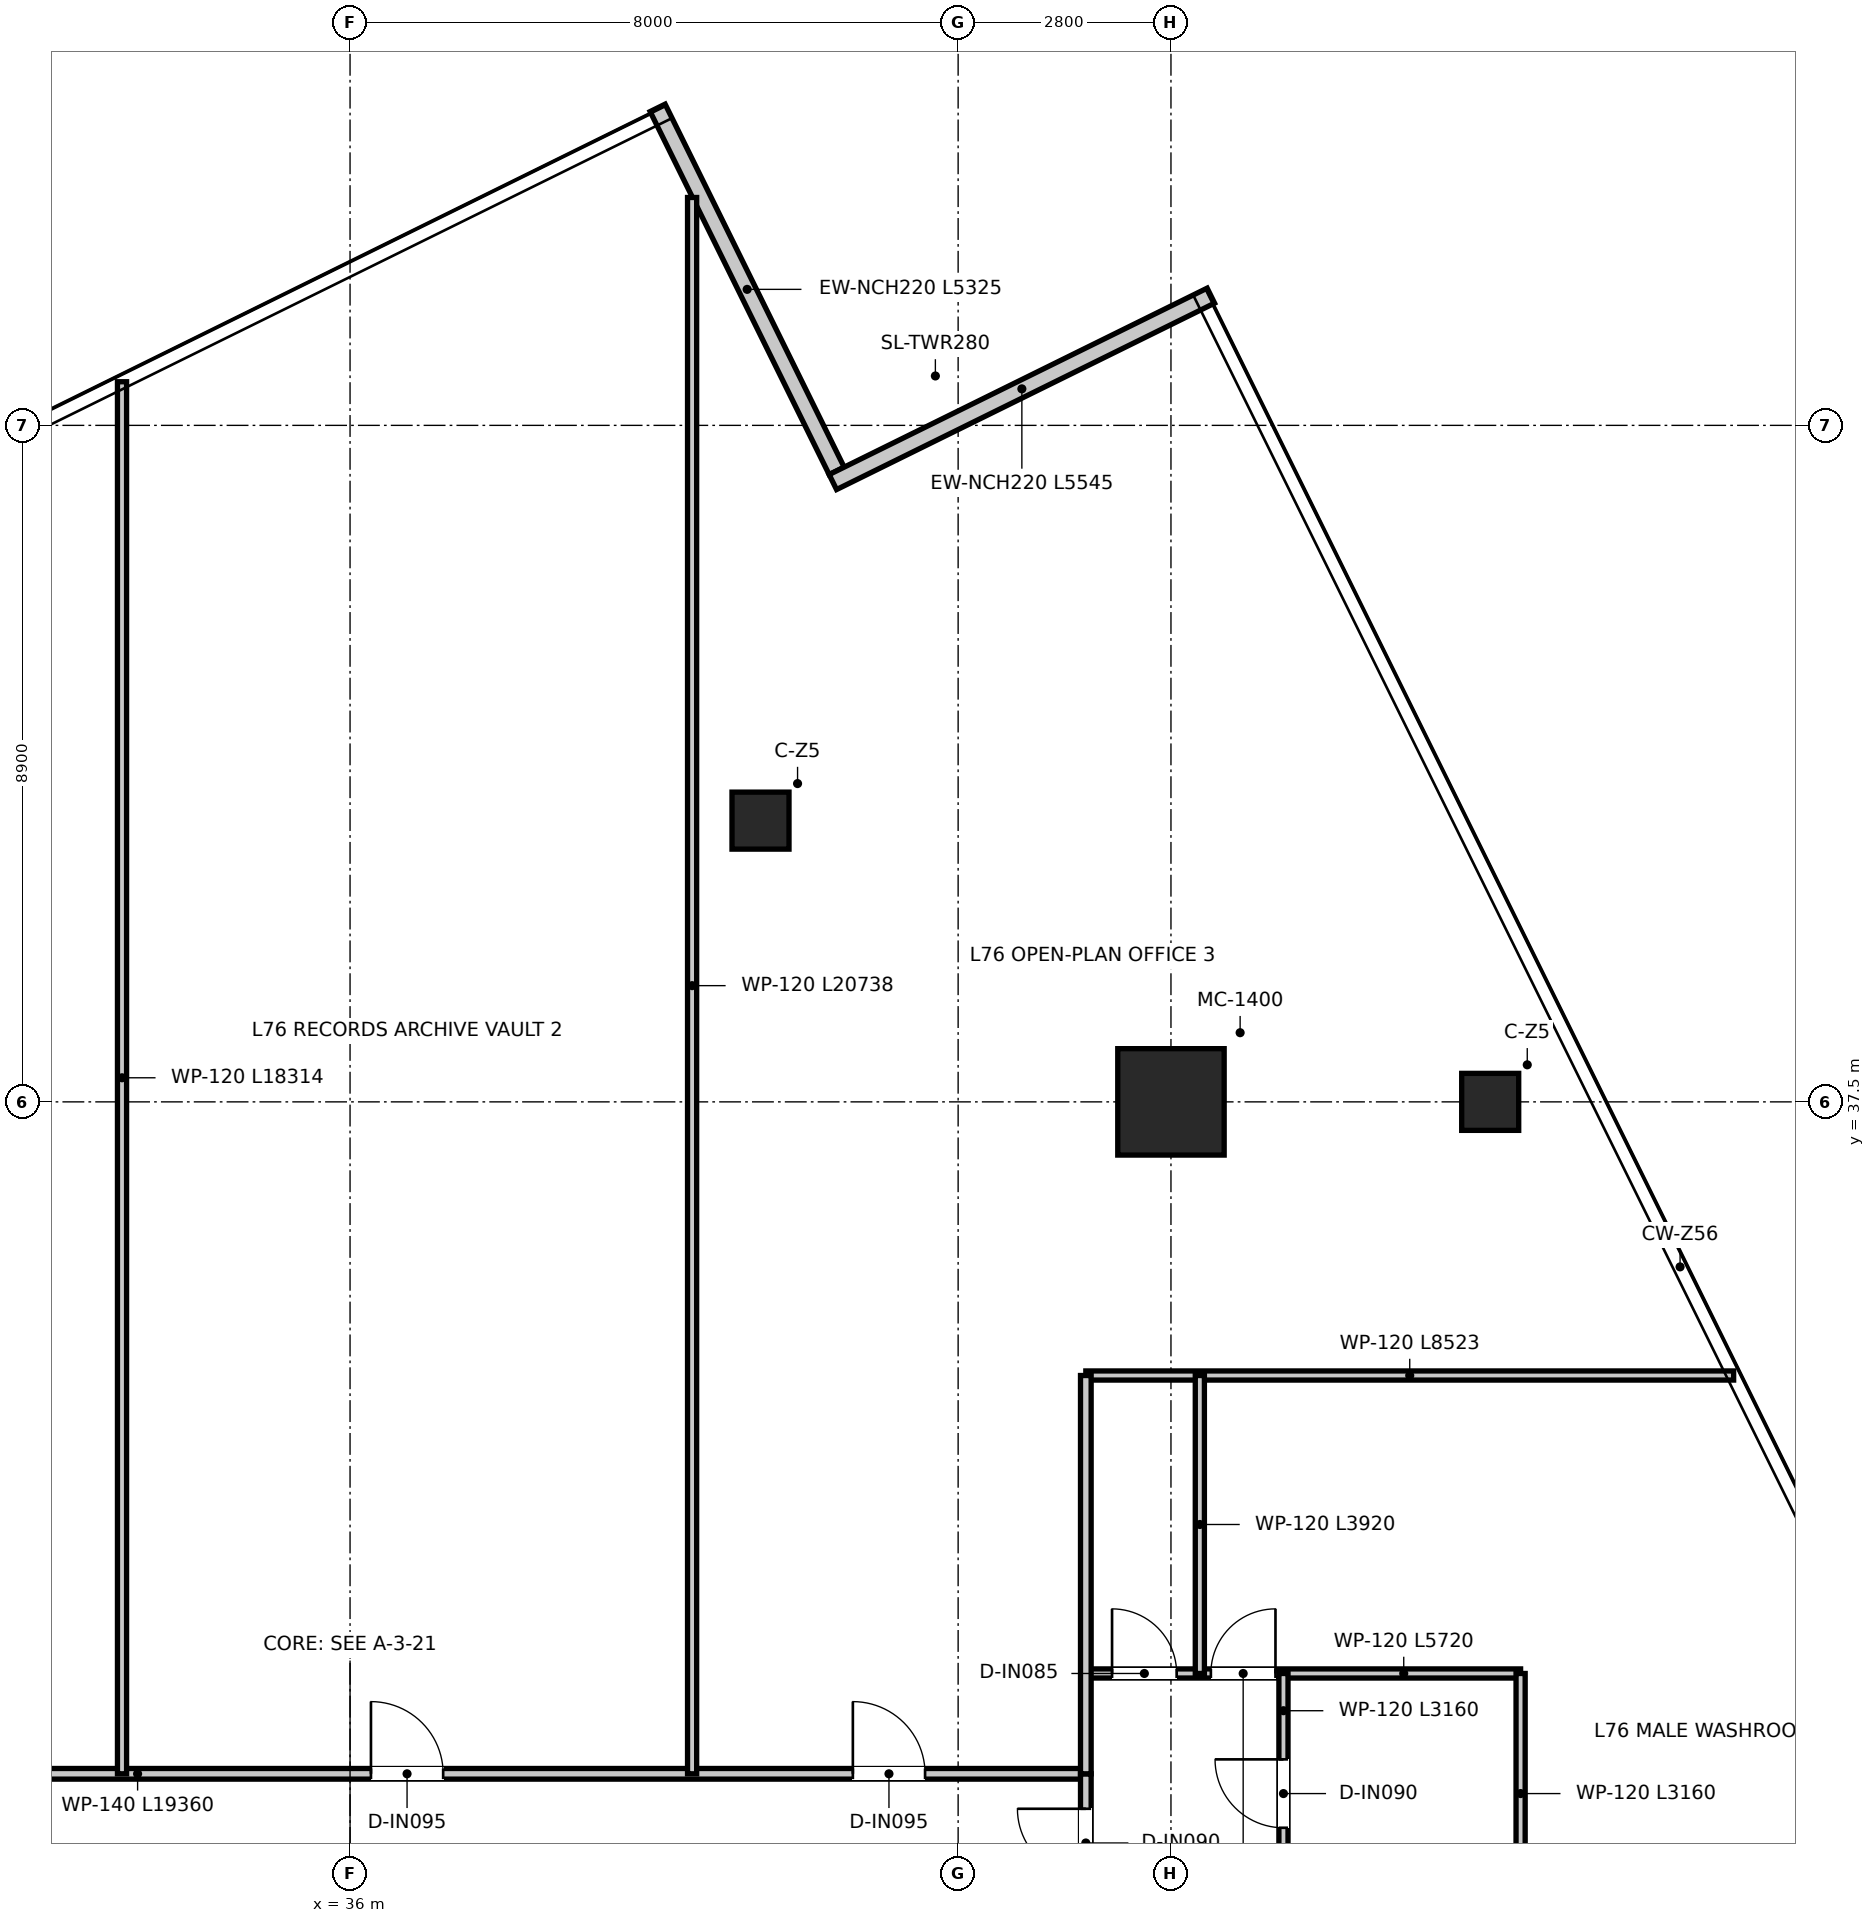
"""IFC4 building model, lengths in metres.
Left out: names, types, materials, properties, quantities, classifications, styles, units other than length and angle.
Written with IfcOpenShell. Run it as: python <this file> out.ifc"""

import sys

from ifc_helpers import new_model, si_unit, direction, frame, frame_2d, origin, origin_2d, place, context, subcontext, project, spatial, rectangle, extrude, source, transform, mapped, element, fill, save


model = new_model("IFC4")
c1 = context("Model", 3, precision=1e-05, world=origin(), true_north=direction((0.0, 1.0)))
c2 = subcontext(c1, "Body", "Model", "MODEL_VIEW")
j1 = project(units=[si_unit("LENGTHUNIT", "METRE"), si_unit("PLANEANGLEUNIT", "RADIAN")], contexts=[c1])
p1 = place(None, origin())
s1 = spatial("IfcSite", under=j1, at=p1, CompositionType="ELEMENT")
p2 = place(p1, origin())
s2 = spatial("IfcBuilding", under=s1, at=p2, CompositionType="ELEMENT")
p3 = place(p2, frame((0.0, 0.0, 310.85)))
s3 = spatial("IfcBuildingStorey", under=s2, at=p3, CompositionType="ELEMENT", Elevation=310.85)
m1 = source(origin(), c2, "Body", "SweptSolid", [
    extrude(rectangle(XDim=1.4, YDim=1.4, at=origin_2d()), origin(), (0.0, 0.0, 1.0), 3.95),
])
p4 = place(p3, frame((46.8, 37.5, 0.0), z_axis=(0.0, 0.0, 1.0), x_axis=(1.0, 0.0, 0.0)))
e1 = element("IfcColumn", 1, at=p4, inside=s3, PredefinedType="USERDEFINED", context=c2, shape_type="MappedRepresentation", body=[
    mapped(m1, transform((0.0, 0.0, 0.0), x_axis=(1.0, 0.0, 0.0), y_axis=(0.0, 1.0, 0.0), z_axis=(0.0, 0.0, 1.0), scale=1.0)),
])
m2 = source(origin(), c2, "Body", "SweptSolid", [
    extrude(rectangle(XDim=0.75, YDim=0.75, at=origin_2d()), origin(), (0.0, 0.0, 1.0), 3.95),
])
for number, where, z_axis, x_axis in (
    (2, (41.4, 41.2, 0.0), (0.0, 0.0, 1.0), (1.0, 0.0, 0.0)),
    (3, (51.0, 37.5, 0.0), (0.0, 0.0, 1.0), (1.0, 0.0, 0.0)),
):
    element("IfcColumn", number, at=place(p3, frame(where, z_axis=z_axis, x_axis=x_axis)), inside=s3, PredefinedType="COLUMN", context=c2, shape_type="MappedRepresentation", body=[
        mapped(m2, transform((0.0, 0.0, 0.0), x_axis=(1.0, 0.0, 0.0), y_axis=(0.0, 1.0, 0.0), z_axis=(0.0, 0.0, 1.0), scale=1.0)),
    ])
p5 = place(p3, frame((42.402, 45.801, 0.0), z_axis=(0.0, 0.0, 1.0), x_axis=(-0.442291978932, 0.896871119712, 0.0)))
e4 = element("IfcWall", 4, at=p5, inside=s3, PredefinedType="ELEMENTEDWALL", context=c2, shape_type="SweptSolid", body=[
    extrude(rectangle(XDim=5.325, YDim=0.22, at=frame_2d((2.663, 0.0))), origin(), (0.0, 0.0, 1.0), 3.67),
])
p6 = place(p3, frame((47.325, 48.106, 0.0), z_axis=(0.0, 0.0, 1.0), x_axis=(-0.896879244314, -0.442275503639, 0.0)))
e5 = element("IfcWall", 5, at=p6, inside=s3, PredefinedType="ELEMENTEDWALL", context=c2, shape_type="SweptSolid", body=[
    extrude(rectangle(XDim=5.545, YDim=0.22, at=frame_2d((2.772, 0.0))), origin(), (0.0, 0.0, 1.0), 3.67),
])
p7 = place(p3, frame((26.32, 28.66, 0.0), z_axis=(0.0, 0.0, 1.0), x_axis=(1.0, 0.0, 0.0)))
e6 = element("IfcWall", 6, at=p7, inside=s3, PredefinedType="PARTITIONING", context=c2, shape_type="SweptSolid", body=[
    extrude(rectangle(XDim=19.36, YDim=0.14, at=frame_2d((9.68, 0.0))), origin(), (0.0, 0.0, 1.0), 3.18),
])
p8 = place(p7, frame((2.865, 0.0, 0.0)))
e7 = element("IfcOpeningElement", 7, at=p8, cuts=e6, PredefinedType="OPENING", context=c2, shape_type="SweptSolid", body=[
    extrude(rectangle(XDim=0.95, YDim=2.1, at=frame_2d((0.475, 1.05))), frame((0.0, 0.08, 0.0), z_axis=(0.0, -1.0, 0.0), x_axis=(1.0, 0.0, 0.0)), (0.0, 0.0, 1.0), 0.16),
])
p9 = place(p7, frame((9.955, 0.0, 0.0)))
e8 = element("IfcOpeningElement", 8, at=p9, cuts=e6, PredefinedType="OPENING", context=c2, shape_type="SweptSolid", body=[
    extrude(rectangle(XDim=0.95, YDim=2.1, at=frame_2d((0.475, 1.05))), frame((0.0, 0.08, 0.0), z_axis=(0.0, -1.0, 0.0), x_axis=(1.0, 0.0, 0.0)), (0.0, 0.0, 1.0), 0.16),
])
p10 = place(p7, frame((16.295, 0.0, 0.0)))
e9 = element("IfcOpeningElement", 9, at=p10, cuts=e6, PredefinedType="OPENING", context=c2, shape_type="SweptSolid", body=[
    extrude(rectangle(XDim=0.95, YDim=2.1, at=frame_2d((0.475, 1.05))), frame((0.0, 0.08, 0.0), z_axis=(0.0, -1.0, 0.0), x_axis=(1.0, 0.0, 0.0)), (0.0, 0.0, 1.0), 0.16),
])
p11 = place(p3, frame((45.68, 9.72, 0.0), z_axis=(0.0, 0.0, 1.0), x_axis=(0.0, 1.0, 0.0)))
e10 = element("IfcWall", 10, at=p11, inside=s3, PredefinedType="PARTITIONING", context=c2, shape_type="SweptSolid", body=[
    extrude(rectangle(XDim=18.94, YDim=0.14, at=frame_2d((9.47, 0.0))), origin(), (0.0, 0.0, 1.0), 3.13),
])
p12 = place(p11, frame((17.58, 0.0, 0.0)))
e11 = element("IfcOpeningElement", 11, at=p12, cuts=e10, PredefinedType="OPENING", context=c2, shape_type="SweptSolid", body=[
    extrude(rectangle(XDim=0.9, YDim=2.1, at=frame_2d((0.45, 1.05))), frame((0.0, 0.08, 0.0), z_axis=(0.0, -1.0, 0.0), x_axis=(1.0, 0.0, 0.0)), (0.0, 0.0, 1.0), 0.16),
])
p13 = place(p11, frame((11.99, 0.0, 0.0)))
e12 = element("IfcOpeningElement", 12, at=p13, cuts=e10, PredefinedType="OPENING", context=c2, shape_type="SweptSolid", body=[
    extrude(rectangle(XDim=0.9, YDim=2.1, at=frame_2d((0.45, 1.05))), frame((0.0, 0.08, 0.0), z_axis=(0.0, -1.0, 0.0), x_axis=(1.0, 0.0, 0.0)), (0.0, 0.0, 1.0), 0.16),
])
p14 = place(p3, frame((45.68, 33.9, 0.0), z_axis=(0.0, 0.0, 1.0), x_axis=(1.0, 0.0, 0.0)))
e13 = element("IfcWall", 13, at=p14, inside=s3, PredefinedType="PARTITIONING", context=c2, shape_type="SweptSolid", body=[
    extrude(rectangle(XDim=8.523, YDim=0.12, at=frame_2d((4.261, 0.0))), origin(), (0.0, 0.0, 1.0), 3.13),
])
p15 = place(p3, frame((45.68, 29.98, 0.0), z_axis=(0.0, 0.0, 1.0), x_axis=(1.0, 0.0, 0.0)))
e14 = element("IfcWall", 14, at=p15, inside=s3, PredefinedType="PARTITIONING", context=c2, shape_type="SweptSolid", body=[
    extrude(rectangle(XDim=5.72, YDim=0.12, at=frame_2d((2.86, 0.0))), origin(), (0.0, 0.0, 1.0), 3.13),
])
p16 = place(p15, frame((1.645, 0.0, 0.0)))
e15 = element("IfcOpeningElement", 15, at=p16, cuts=e14, PredefinedType="OPENING", context=c2, shape_type="SweptSolid", body=[
    extrude(rectangle(XDim=0.85, YDim=2.1, at=frame_2d((0.425, 1.05))), frame((0.0, 0.07, 0.0), z_axis=(0.0, -1.0, 0.0), x_axis=(1.0, 0.0, 0.0)), (0.0, 0.0, 1.0), 0.14),
])
p17 = place(p15, frame((0.345, 0.0, 0.0)))
e16 = element("IfcOpeningElement", 16, at=p17, cuts=e14, PredefinedType="OPENING", context=c2, shape_type="SweptSolid", body=[
    extrude(rectangle(XDim=0.85, YDim=2.1, at=frame_2d((0.425, 1.05))), frame((0.0, 0.07, 0.0), z_axis=(0.0, -1.0, 0.0), x_axis=(1.0, 0.0, 0.0)), (0.0, 0.0, 1.0), 0.14),
])
p18 = place(p3, frame((51.4, 26.82, 0.0), z_axis=(0.0, 0.0, 1.0), x_axis=(0.0, 1.0, 0.0)))
e17 = element("IfcWall", 17, at=p18, inside=s3, PredefinedType="PARTITIONING", context=c2, shape_type="SweptSolid", body=[
    extrude(rectangle(XDim=3.16, YDim=0.12, at=frame_2d((1.58, 0.0))), origin(), (0.0, 0.0, 1.0), 3.67),
])
p19 = place(p3, frame((48.28, 26.82, 0.0), z_axis=(0.0, 0.0, 1.0), x_axis=(0.0, 1.0, 0.0)))
e18 = element("IfcWall", 18, at=p19, inside=s3, PredefinedType="PARTITIONING", context=c2, shape_type="SweptSolid", body=[
    extrude(rectangle(XDim=3.16, YDim=0.12, at=frame_2d((1.58, 0.0))), origin(), (0.0, 0.0, 1.0), 3.18),
])
p20 = place(p19, frame((1.13, 0.0, 0.0)))
e19 = element("IfcOpeningElement", 19, at=p20, cuts=e18, PredefinedType="OPENING", context=c2, shape_type="SweptSolid", body=[
    extrude(rectangle(XDim=0.9, YDim=2.1, at=frame_2d((0.45, 1.05))), frame((0.0, 0.07, 0.0), z_axis=(0.0, -1.0, 0.0), x_axis=(1.0, 0.0, 0.0)), (0.0, 0.0, 1.0), 0.14),
])
p21 = place(p3, frame((47.18, 29.98, 0.0), z_axis=(0.0, 0.0, 1.0), x_axis=(0.0, 1.0, 0.0)))
e20 = element("IfcWall", 20, at=p21, inside=s3, PredefinedType="PARTITIONING", context=c2, shape_type="SweptSolid", body=[
    extrude(rectangle(XDim=3.92, YDim=0.12, at=frame_2d((1.96, 0.0))), origin(), (0.0, 0.0, 1.0), 3.31),
])
p22 = place(p3, frame((45.68, 28.66, 0.0), z_axis=(0.0, 0.0, 1.0), x_axis=(0.0, 1.0, 0.0)))
e21 = element("IfcWall", 21, at=p22, inside=s3, PredefinedType="PARTITIONING", context=c2, shape_type="SweptSolid", body=[
    extrude(rectangle(XDim=5.24, YDim=0.14, at=frame_2d((2.62, 0.0))), origin(), (0.0, 0.0, 1.0), 3.43),
])
p23 = place(p3, frame((33.0, 28.66, 0.0), z_axis=(0.0, 0.0, 1.0), x_axis=(0.0, 1.0, 0.0)))
e22 = element("IfcWall", 22, at=p23, inside=s3, PredefinedType="PARTITIONING", context=c2, shape_type="SweptSolid", body=[
    extrude(rectangle(XDim=18.314, YDim=0.12, at=frame_2d((9.157, 0.0))), origin(), (0.0, 0.0, 1.0), 3.13),
])
p24 = place(p3, frame((40.5, 28.66, 0.0), z_axis=(0.0, 0.0, 1.0), x_axis=(0.0, 1.0, 0.0)))
e23 = element("IfcWall", 23, at=p24, inside=s3, PredefinedType="PARTITIONING", context=c2, shape_type="SweptSolid", body=[
    extrude(rectangle(XDim=20.738, YDim=0.12, at=frame_2d((10.369, 0.0))), origin(), (0.0, 0.0, 1.0), 3.13),
])
p25 = place(p12, origin())
e24 = element("IfcDoor", 24, at=p25, inside=s3, OperationType="SINGLE_SWING_RIGHT", PredefinedType="DOOR", context=c2, shape_type="SweptSolid", body=[
    extrude(rectangle(XDim=0.9, YDim=2.1, at=frame_2d((0.45, 1.05))), frame((0.0, 0.025, 0.0), z_axis=(0.0, -1.0, 0.0), x_axis=(1.0, 0.0, 0.0)), (0.0, 0.0, 1.0), 0.05),
])
fill(e11, e24)
p26 = place(p16, origin())
e25 = element("IfcDoor", 25, at=p26, inside=s3, OperationType="SINGLE_SWING_RIGHT", PredefinedType="DOOR", context=c2, shape_type="SweptSolid", body=[
    extrude(rectangle(XDim=0.85, YDim=2.1, at=frame_2d((0.425, 1.05))), frame((0.0, 0.025, 0.0), z_axis=(0.0, -1.0, 0.0), x_axis=(1.0, 0.0, 0.0)), (0.0, 0.0, 1.0), 0.05),
])
fill(e15, e25)
p27 = place(p17, origin())
e26 = element("IfcDoor", 26, at=p27, inside=s3, OperationType="SINGLE_SWING_LEFT", PredefinedType="DOOR", context=c2, shape_type="SweptSolid", body=[
    extrude(rectangle(XDim=0.85, YDim=2.1, at=frame_2d((0.425, 1.05))), frame((0.0, 0.025, 0.0), z_axis=(0.0, -1.0, 0.0), x_axis=(1.0, 0.0, 0.0)), (0.0, 0.0, 1.0), 0.05),
])
fill(e16, e26)
p28 = place(p20, origin())
e27 = element("IfcDoor", 27, at=p28, inside=s3, OperationType="SINGLE_SWING_RIGHT", PredefinedType="DOOR", context=c2, shape_type="SweptSolid", body=[
    extrude(rectangle(XDim=0.9, YDim=2.1, at=frame_2d((0.45, 1.05))), frame((0.0, 0.025, 0.0), z_axis=(0.0, -1.0, 0.0), x_axis=(1.0, 0.0, 0.0)), (0.0, 0.0, 1.0), 0.05),
])
fill(e19, e27)
p29 = place(p9, origin())
e28 = element("IfcDoor", 28, at=p29, inside=s3, OperationType="SINGLE_SWING_LEFT", PredefinedType="DOOR", context=c2, shape_type="SweptSolid", body=[
    extrude(rectangle(XDim=0.95, YDim=2.1, at=frame_2d((0.475, 1.05))), frame((0.0, 0.025, 0.0), z_axis=(0.0, -1.0, 0.0), x_axis=(1.0, 0.0, 0.0)), (0.0, 0.0, 1.0), 0.05),
])
fill(e8, e28)
p30 = place(p10, origin())
e29 = element("IfcDoor", 29, at=p30, inside=s3, OperationType="SINGLE_SWING_LEFT", PredefinedType="DOOR", context=c2, shape_type="SweptSolid", body=[
    extrude(rectangle(XDim=0.95, YDim=2.1, at=frame_2d((0.475, 1.05))), frame((0.0, 0.025, 0.0), z_axis=(0.0, -1.0, 0.0), x_axis=(1.0, 0.0, 0.0)), (0.0, 0.0, 1.0), 0.05),
])
fill(e9, e29)
save(model, sys.argv[1])
